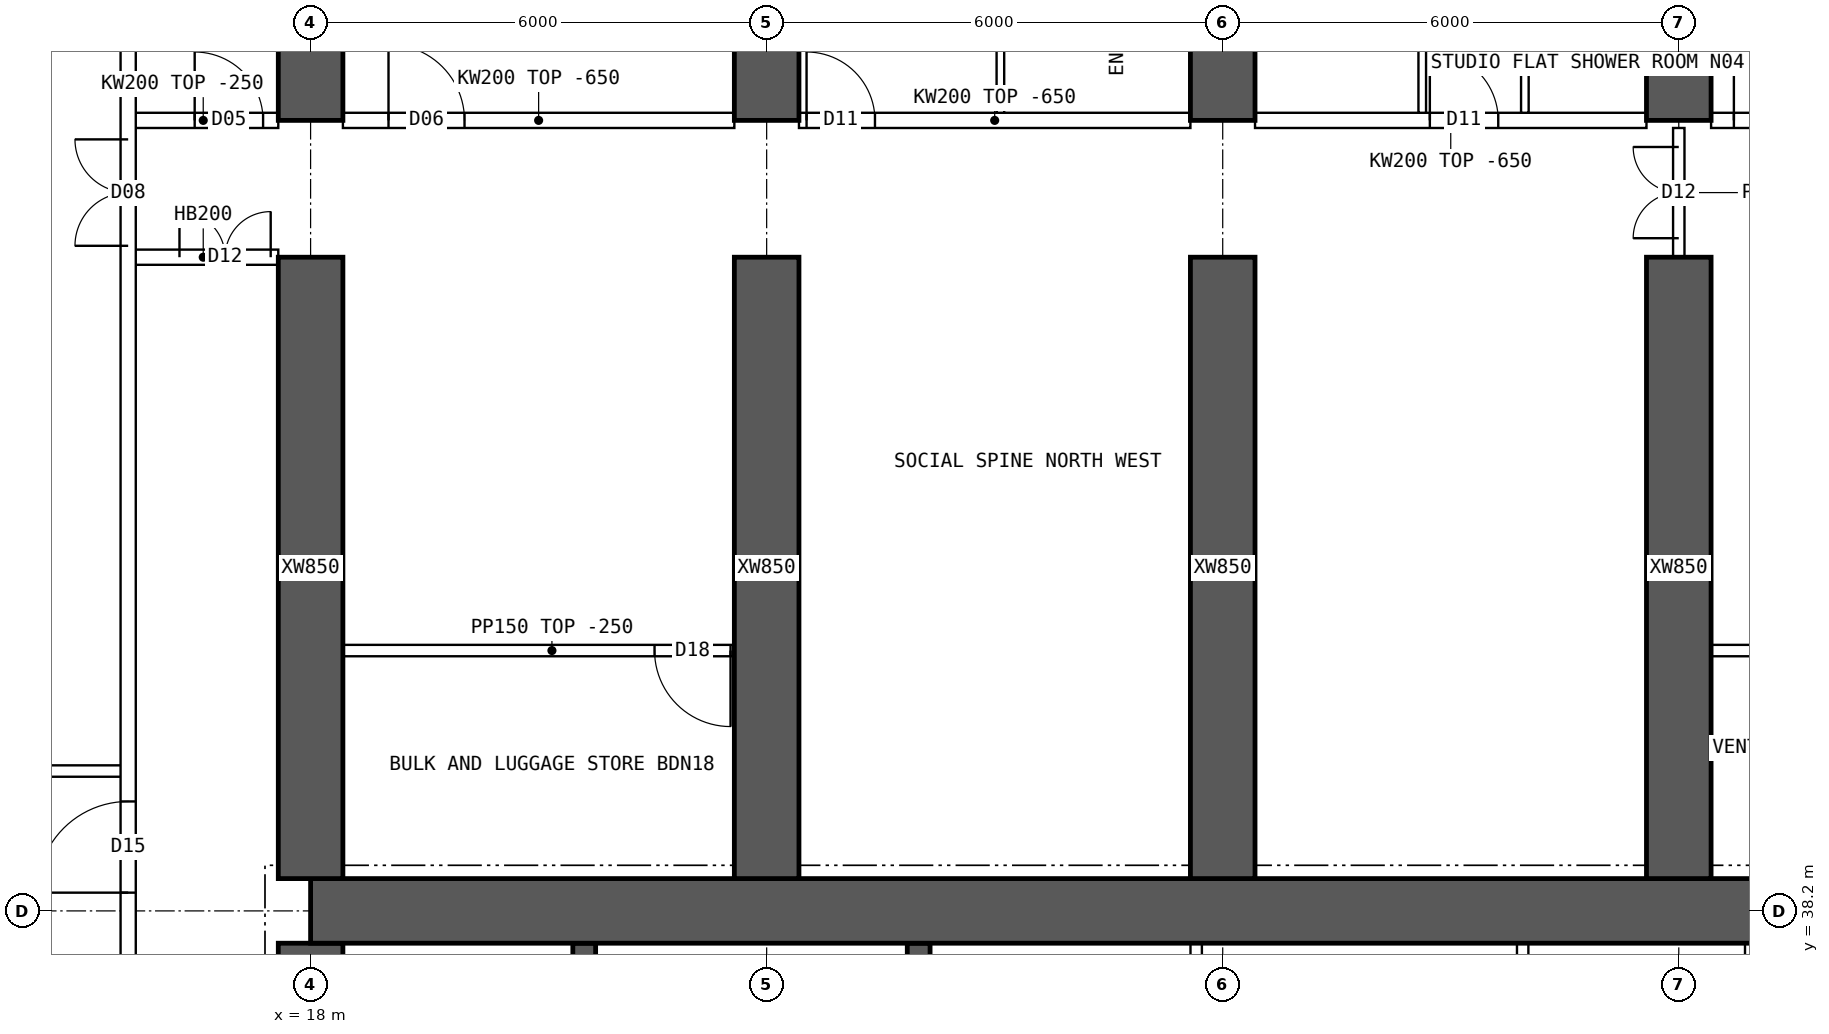
"""IFC4 building model, lengths in metres.
Left out: names, types, materials, properties, quantities, classifications, styles, units other than length and angle.
Written with IfcOpenShell. Run it as: python <this file> out.ifc"""

import sys

from ifc_helpers import new_model, si_unit, direction, frame, frame_2d, origin, place, context, subcontext, project, spatial, polyline, rectangle, outline, extrude, element, fill, save


model = new_model("IFC4")
c1 = context("Model", 3, precision=1e-05, world=origin(), true_north=direction((0.0, 1.0)))
c2 = subcontext(c1, "Body", "Model", "MODEL_VIEW")
j1 = project(units=[si_unit("LENGTHUNIT", "METRE"), si_unit("PLANEANGLEUNIT", "RADIAN")], contexts=[c1])
p1 = place(None, origin())
s1 = spatial("IfcSite", under=j1, at=p1, CompositionType="ELEMENT")
p2 = place(p1, origin())
s2 = spatial("IfcBuilding", under=s1, at=p2, CompositionType="ELEMENT")
p3 = place(p2, frame((0.0, 0.0, 171.1)))
s3 = spatial("IfcBuildingStorey", under=s2, at=p3, CompositionType="ELEMENT", Elevation=171.1)
p4 = place(p3, frame((18.0, 38.2, 0.0), z_axis=(0.0, 0.0, 1.0), x_axis=(1.0, 0.0, 0.0)))
e1 = element("IfcWall", 1, at=p4, inside=s3, PredefinedType="SHEAR", context=c2, shape_type="SweptSolid", body=[
    extrude(rectangle(XDim=48.0, YDim=0.85, at=frame_2d((24.0, 0.0))), origin(), (0.0, 0.0, 1.0), 3.75),
])
p5 = place(p3, frame((18.0, 26.225, 0.0), z_axis=(0.0, 0.0, 1.0), x_axis=(0.0, 1.0, 0.0)))
e2 = element("IfcWall", 2, at=p5, inside=s3, PredefinedType="SHEAR", context=c2, shape_type="SweptSolid", body=[
    extrude(rectangle(XDim=11.55, YDim=0.85, at=frame_2d((5.775, 0.0))), origin(), (0.0, 0.0, 1.0), 3.75),
])
p6 = place(p5, frame((5.075, 0.0, 0.0)))
e3 = element("IfcOpeningElement", 3, at=p6, cuts=e2, PredefinedType="OPENING", context=c2, shape_type="SweptSolid", body=[
    extrude(rectangle(XDim=1.2, YDim=2.1, at=frame_2d((0.6, 1.05))), frame((0.0, 0.435, 0.0), z_axis=(0.0, -1.0, 0.0), x_axis=(1.0, 0.0, 0.0)), (0.0, 0.0, 1.0), 0.87),
])
for number, where, z_axis, x_axis in (
    (4, (21.6, 34.75, 0.0), (0.0, 0.0, 1.0), (0.0, 1.0, 0.0)),
    (5, (26.0, 34.75, 0.0), (0.0, 0.0, 1.0), (0.0, 1.0, 0.0)),
):
    element("IfcWall", number, at=place(p3, frame(where, z_axis=z_axis, x_axis=x_axis)), inside=s3, PredefinedType="SHEAR", context=c2, shape_type="SweptSolid", body=[
        extrude(rectangle(XDim=3.025, YDim=0.3, at=frame_2d((1.512, 0.0))), origin(), (0.0, 0.0, 1.0), 3.75),
    ])
p7 = place(p3, frame((18.0, 48.6, 0.0), z_axis=(0.0, 0.0, 1.0), x_axis=(0.0, 1.0, 0.0)))
e6 = element("IfcWall", 6, at=p7, inside=s3, PredefinedType="SHEAR", context=c2, shape_type="SweptSolid", body=[
    extrude(rectangle(XDim=5.4, YDim=0.85, at=frame_2d((2.7, 0.0))), origin(), (0.0, 0.0, 1.0), 3.75),
])
p8 = place(p3, frame((18.0, 38.625, 0.0), z_axis=(0.0, 0.0, 1.0), x_axis=(0.0, 1.0, 0.0)))
e7 = element("IfcWall", 7, at=p8, inside=s3, PredefinedType="SHEAR", context=c2, shape_type="SweptSolid", body=[
    extrude(rectangle(XDim=8.175, YDim=0.85, at=frame_2d((4.087, 0.0))), origin(), (0.0, 0.0, 1.0), 3.75),
])
p9 = place(p3, frame((24.0, 48.6, 0.0), z_axis=(0.0, 0.0, 1.0), x_axis=(0.0, 1.0, 0.0)))
e8 = element("IfcWall", 8, at=p9, inside=s3, PredefinedType="SHEAR", context=c2, shape_type="SweptSolid", body=[
    extrude(rectangle(XDim=5.4, YDim=0.85, at=frame_2d((2.7, 0.0))), origin(), (0.0, 0.0, 1.0), 3.75),
])
p10 = place(p3, frame((24.0, 38.625, 0.0), z_axis=(0.0, 0.0, 1.0), x_axis=(0.0, 1.0, 0.0)))
e9 = element("IfcWall", 9, at=p10, inside=s3, PredefinedType="SHEAR", context=c2, shape_type="SweptSolid", body=[
    extrude(rectangle(XDim=8.175, YDim=0.85, at=frame_2d((4.087, 0.0))), origin(), (0.0, 0.0, 1.0), 3.75),
])
p11 = place(p3, frame((30.0, 48.6, 0.0), z_axis=(0.0, 0.0, 1.0), x_axis=(0.0, 1.0, 0.0)))
e10 = element("IfcWall", 10, at=p11, inside=s3, PredefinedType="SHEAR", context=c2, shape_type="SweptSolid", body=[
    extrude(rectangle(XDim=5.4, YDim=0.85, at=frame_2d((2.7, 0.0))), origin(), (0.0, 0.0, 1.0), 3.75),
])
p12 = place(p3, frame((30.0, 38.625, 0.0), z_axis=(0.0, 0.0, 1.0), x_axis=(0.0, 1.0, 0.0)))
e11 = element("IfcWall", 11, at=p12, inside=s3, PredefinedType="SHEAR", context=c2, shape_type="SweptSolid", body=[
    extrude(rectangle(XDim=8.175, YDim=0.85, at=frame_2d((4.087, 0.0))), origin(), (0.0, 0.0, 1.0), 3.75),
])
p13 = place(p3, frame((36.0, 48.6, 0.0), z_axis=(0.0, 0.0, 1.0), x_axis=(0.0, 1.0, 0.0)))
e12 = element("IfcWall", 12, at=p13, inside=s3, PredefinedType="SHEAR", context=c2, shape_type="SweptSolid", body=[
    extrude(rectangle(XDim=5.4, YDim=0.85, at=frame_2d((2.7, 0.0))), origin(), (0.0, 0.0, 1.0), 3.75),
])
p14 = place(p3, frame((36.0, 38.625, 0.0), z_axis=(0.0, 0.0, 1.0), x_axis=(0.0, 1.0, 0.0)))
e13 = element("IfcWall", 13, at=p14, inside=s3, PredefinedType="SHEAR", context=c2, shape_type="SweptSolid", body=[
    extrude(rectangle(XDim=8.175, YDim=0.85, at=frame_2d((4.087, 0.0))), origin(), (0.0, 0.0, 1.0), 3.75),
])
for number, where, z_axis, x_axis in (
    (14, (29.651, 34.75, 0.0), (0.0, 0.0, 1.0), (0.0, 1.0, 0.0)),
    (15, (33.946, 34.75, 0.0), (0.0, 0.0, 1.0), (0.0, 1.0, 0.0)),
    (16, (36.946, 34.75, 0.0), (0.0, 0.0, 1.0), (0.0, 1.0, 0.0)),
):
    element("IfcWall", number, at=place(p3, frame(where, z_axis=z_axis, x_axis=x_axis)), inside=s3, PredefinedType="SOLIDWALL", context=c2, shape_type="SweptSolid", body=[
        extrude(rectangle(XDim=3.025, YDim=0.15, at=frame_2d((1.512, 0.0))), origin(), (0.0, 0.0, 1.0), 3.5),
    ])
p15 = place(p3, frame((15.6, 48.6, 0.0), z_axis=(0.0, 0.0, 1.0), x_axis=(1.0, 0.0, 0.0)))
e17 = element("IfcWall", 17, at=p15, inside=s3, PredefinedType="SOLIDWALL", context=c2, shape_type="SweptSolid", body=[
    extrude(rectangle(XDim=1.975, YDim=0.2, at=frame_2d((0.987, 0.0))), origin(), (0.0, 0.0, 1.0), 3.5),
])
p16 = place(p15, frame((0.875, 0.0, 0.0)))
e18 = element("IfcOpeningElement", 18, at=p16, cuts=e17, PredefinedType="OPENING", context=c2, shape_type="SweptSolid", body=[
    extrude(rectangle(XDim=0.9, YDim=2.1, at=frame_2d((0.45, 1.05))), frame((0.0, 0.11, 0.0), z_axis=(0.0, -1.0, 0.0), x_axis=(1.0, 0.0, 0.0)), (0.0, 0.0, 1.0), 0.22),
])
p17 = place(p3, frame((15.6, 46.8, 0.0), z_axis=(0.0, 0.0, 1.0), x_axis=(1.0, 0.0, 0.0)))
e19 = element("IfcWall", 19, at=p17, inside=s3, PredefinedType="SOLIDWALL", context=c2, shape_type="SweptSolid", body=[
    extrude(rectangle(XDim=1.975, YDim=0.2, at=frame_2d((0.987, 0.0))), origin(), (0.0, 0.0, 1.0), 3.5),
])
p18 = place(p17, frame((0.675, 0.0, 0.0)))
e20 = element("IfcOpeningElement", 20, at=p18, cuts=e19, PredefinedType="OPENING", context=c2, shape_type="SweptSolid", body=[
    extrude(rectangle(XDim=1.2, YDim=2.1, at=frame_2d((0.6, 1.05))), frame((0.0, 0.11, 0.0), z_axis=(0.0, -1.0, 0.0), x_axis=(1.0, 0.0, 0.0)), (0.0, 0.0, 1.0), 0.22),
])
p19 = place(p3, frame((18.425, 48.6, 0.0), z_axis=(0.0, 0.0, 1.0), x_axis=(1.0, 0.0, 0.0)))
e21 = element("IfcWall", 21, at=p19, inside=s3, PredefinedType="SOLIDWALL", context=c2, shape_type="SweptSolid", body=[
    extrude(outline(polyline([(0.0, 0.0), (5.15, 0.0), (5.15, 3.1), (0.0, 3.1), (0.0, 0.0)])), frame((0.0, 0.1, 0.0), z_axis=(0.0, -1.0, 0.0), x_axis=(1.0, 0.0, 0.0)), (0.0, 0.0, 1.0), 0.2),
])
p20 = place(p19, frame((0.6, 0.0, 0.0)))
e22 = element("IfcOpeningElement", 22, at=p20, cuts=e21, PredefinedType="OPENING", context=c2, shape_type="SweptSolid", body=[
    extrude(rectangle(XDim=1.0, YDim=2.1, at=frame_2d((0.5, 1.05))), frame((0.0, 0.11, 0.0), z_axis=(0.0, -1.0, 0.0), x_axis=(1.0, 0.0, 0.0)), (0.0, 0.0, 1.0), 0.22),
])
p21 = place(p3, frame((24.425, 48.6, 0.0), z_axis=(0.0, 0.0, 1.0), x_axis=(1.0, 0.0, 0.0)))
e23 = element("IfcWall", 23, at=p21, inside=s3, PredefinedType="SOLIDWALL", context=c2, shape_type="SweptSolid", body=[
    extrude(outline(polyline([(0.0, 0.0), (5.15, 0.0), (5.15, 3.1), (0.0, 3.1), (0.0, 0.0)])), frame((0.0, 0.1, 0.0), z_axis=(0.0, -1.0, 0.0), x_axis=(1.0, 0.0, 0.0)), (0.0, 0.0, 1.0), 0.2),
])
p22 = place(p21, frame((0.1, 0.0, 0.0)))
e24 = element("IfcOpeningElement", 24, at=p22, cuts=e23, PredefinedType="OPENING", context=c2, shape_type="SweptSolid", body=[
    extrude(rectangle(XDim=0.9, YDim=2.1, at=frame_2d((0.45, 1.05))), frame((0.0, 0.11, 0.0), z_axis=(0.0, -1.0, 0.0), x_axis=(1.0, 0.0, 0.0)), (0.0, 0.0, 1.0), 0.22),
])
p23 = place(p3, frame((30.425, 48.6, 0.0), z_axis=(0.0, 0.0, 1.0), x_axis=(1.0, 0.0, 0.0)))
e25 = element("IfcWall", 25, at=p23, inside=s3, PredefinedType="SOLIDWALL", context=c2, shape_type="SweptSolid", body=[
    extrude(outline(polyline([(0.0, 0.0), (5.15, 0.0), (5.15, 3.1), (0.0, 3.1), (0.0, 0.0)])), frame((0.0, 0.1, 0.0), z_axis=(0.0, -1.0, 0.0), x_axis=(1.0, 0.0, 0.0)), (0.0, 0.0, 1.0), 0.2),
])
p24 = place(p23, frame((2.3, 0.0, 0.0)))
e26 = element("IfcOpeningElement", 26, at=p24, cuts=e25, PredefinedType="OPENING", context=c2, shape_type="SweptSolid", body=[
    extrude(rectangle(XDim=0.9, YDim=2.1, at=frame_2d((0.45, 1.05))), frame((0.0, 0.11, 0.0), z_axis=(0.0, -1.0, 0.0), x_axis=(1.0, 0.0, 0.0)), (0.0, 0.0, 1.0), 0.22),
])
p25 = place(p3, frame((36.425, 48.6, 0.0), z_axis=(0.0, 0.0, 1.0), x_axis=(1.0, 0.0, 0.0)))
e27 = element("IfcWall", 27, at=p25, inside=s3, PredefinedType="SOLIDWALL", context=c2, shape_type="SweptSolid", body=[
    extrude(outline(polyline([(0.0, 0.0), (5.15, 0.0), (5.15, 3.1), (0.0, 3.1), (0.0, 0.0)])), frame((0.0, 0.1, 0.0), z_axis=(0.0, -1.0, 0.0), x_axis=(1.0, 0.0, 0.0)), (0.0, 0.0, 1.0), 0.2),
])
p26 = place(p25, frame((0.3, 0.0, 0.0)))
e28 = element("IfcOpeningElement", 28, at=p26, cuts=e27, PredefinedType="OPENING", context=c2, shape_type="SweptSolid", body=[
    extrude(rectangle(XDim=1.0, YDim=2.1, at=frame_2d((0.5, 1.05))), frame((0.0, 0.11, 0.0), z_axis=(0.0, -1.0, 0.0), x_axis=(1.0, 0.0, 0.0)), (0.0, 0.0, 1.0), 0.22),
])
p27 = place(p3, frame((27.075, 51.45, 0.0), z_axis=(0.0, 0.0, 1.0), x_axis=(0.0, -1.0, 0.0)))
e29 = element("IfcWall", 29, at=p27, inside=s3, PredefinedType="PARTITIONING", context=c2, shape_type="SweptSolid", body=[
    extrude(outline(polyline([(0.0, 0.0), (2.75, 0.0), (2.75, 3.1), (2.702, 3.1), (2.7, 3.5), (0.0, 3.5), (0.0, 0.0)])), frame((0.0, 0.05, 0.0), z_axis=(0.0, -1.0, 0.0), x_axis=(1.0, 0.0, 0.0)), (0.0, 0.0, 1.0), 0.1),
])
p28 = place(p3, frame((32.625, 51.05, 0.0), z_axis=(0.0, 0.0, 1.0), x_axis=(0.0, -1.0, 0.0)))
e30 = element("IfcWall", 30, at=p28, inside=s3, PredefinedType="PARTITIONING", context=c2, shape_type="SweptSolid", body=[
    extrude(outline(polyline([(0.0, 0.0), (2.35, 0.0), (2.35, 3.1), (2.302, 3.1), (2.3, 3.5), (0.0, 3.5), (0.0, 0.0)])), frame((0.0, 0.05, 0.0), z_axis=(0.0, -1.0, 0.0), x_axis=(1.0, 0.0, 0.0)), (0.0, 0.0, 1.0), 0.1),
])
p29 = place(p3, frame((33.975, 51.05, 0.0), z_axis=(0.0, 0.0, 1.0), x_axis=(0.0, -1.0, 0.0)))
e31 = element("IfcWall", 31, at=p29, inside=s3, PredefinedType="PARTITIONING", context=c2, shape_type="SweptSolid", body=[
    extrude(outline(polyline([(0.0, 0.0), (2.35, 0.0), (2.35, 3.1), (2.302, 3.1), (2.3, 3.5), (0.0, 3.5), (0.0, 0.0)])), frame((0.0, 0.05, 0.0), z_axis=(0.0, -1.0, 0.0), x_axis=(1.0, 0.0, 0.0)), (0.0, 0.0, 1.0), 0.1),
])
p30 = place(p29, frame((0.8, 0.0, 0.0)))
e32 = element("IfcOpeningElement", 32, at=p30, cuts=e31, PredefinedType="OPENING", context=c2, shape_type="SweptSolid", body=[
    extrude(rectangle(XDim=0.8, YDim=2.1, at=frame_2d((0.4, 1.05))), frame((0.0, 0.06, 0.0), z_axis=(0.0, -1.0, 0.0), x_axis=(1.0, 0.0, 0.0)), (0.0, 0.0, 1.0), 0.12),
])
p31 = place(p3, frame((23.925, 41.625, 0.0), z_axis=(0.0, 0.0, 1.0), x_axis=(-1.0, 0.0, 0.0)))
e33 = element("IfcWall", 33, at=p31, inside=s3, PredefinedType="PARTITIONING", context=c2, shape_type="SweptSolid", body=[
    extrude(rectangle(XDim=5.5, YDim=0.15, at=frame_2d((2.75, 0.0))), origin(), (0.0, 0.0, 1.0), 3.5),
])
p32 = place(p31, frame((0.4, 0.0, 0.0)))
e34 = element("IfcOpeningElement", 34, at=p32, cuts=e33, PredefinedType="OPENING", context=c2, shape_type="SweptSolid", body=[
    extrude(rectangle(XDim=1.0, YDim=2.1, at=frame_2d((0.5, 1.05))), frame((0.0, 0.085, 0.0), z_axis=(0.0, -1.0, 0.0), x_axis=(1.0, 0.0, 0.0)), (0.0, 0.0, 1.0), 0.17),
])
p33 = place(p3, frame((41.575, 41.625, 0.0), z_axis=(0.0, 0.0, 1.0), x_axis=(-1.0, 0.0, 0.0)))
e35 = element("IfcWall", 35, at=p33, inside=s3, PredefinedType="PARTITIONING", context=c2, shape_type="SweptSolid", body=[
    extrude(rectangle(XDim=5.5, YDim=0.15, at=frame_2d((2.75, 0.0))), origin(), (0.0, 0.0, 1.0), 3.5),
])
p34 = place(p33, frame((0.4, 0.0, 0.0)))
e36 = element("IfcOpeningElement", 36, at=p34, cuts=e35, PredefinedType="OPENING", context=c2, shape_type="SweptSolid", body=[
    extrude(rectangle(XDim=1.0, YDim=2.1, at=frame_2d((0.5, 1.05))), frame((0.0, 0.085, 0.0), z_axis=(0.0, -1.0, 0.0), x_axis=(1.0, 0.0, 0.0)), (0.0, 0.0, 1.0), 0.17),
])
p35 = place(p3, frame((36.0, 46.8, 0.0), z_axis=(0.0, 0.0, 1.0), x_axis=(0.0, 1.0, 0.0)))
e37 = element("IfcWall", 37, at=p35, inside=s3, PredefinedType="PARTITIONING", context=c2, shape_type="SweptSolid", body=[
    extrude(outline(polyline([(0.0, 0.0), (1.7, 0.0), (1.7, 3.1), (0.0, 3.1), (0.0, 0.0)])), frame((0.0, 0.075, 0.0), z_axis=(0.0, -1.0, 0.0), x_axis=(1.0, 0.0, 0.0)), (0.0, 0.0, 1.0), 0.15),
])
p36 = place(p35, frame((0.25, 0.0, 0.0)))
e38 = element("IfcOpeningElement", 38, at=p36, cuts=e37, PredefinedType="OPENING", context=c2, shape_type="SweptSolid", body=[
    extrude(rectangle(XDim=1.2, YDim=2.1, at=frame_2d((0.6, 1.05))), frame((0.0, 0.085, 0.0), z_axis=(0.0, -1.0, 0.0), x_axis=(1.0, 0.0, 0.0)), (0.0, 0.0, 1.0), 0.17),
])
p37 = place(p3, frame((15.6, 10.446, 0.0), z_axis=(0.0, 0.0, 1.0), x_axis=(0.0, 1.0, 0.0)))
e39 = element("IfcWall", 39, at=p37, inside=s3, PredefinedType="SOLIDWALL", context=c2, shape_type="SweptSolid", body=[
    extrude(rectangle(XDim=43.107, YDim=0.2, at=frame_2d((21.554, 0.0))), origin(), (0.0, 0.0, 1.0), 3.5),
])
p38 = place(p37, frame((13.914, 0.0, 0.0)))
e40 = element("IfcOpeningElement", 40, at=p38, cuts=e39, PredefinedType="OPENING", context=c2, shape_type="SweptSolid", body=[
    extrude(rectangle(XDim=1.2, YDim=2.1, at=frame_2d((0.6, 1.05))), frame((0.0, 0.11, 0.0), z_axis=(0.0, -1.0, 0.0), x_axis=(1.0, 0.0, 0.0)), (0.0, 0.0, 1.0), 0.22),
])
p39 = place(p37, frame((27.994, 0.0, 0.0)))
e41 = element("IfcOpeningElement", 41, at=p39, cuts=e39, PredefinedType="OPENING", context=c2, shape_type="SweptSolid", body=[
    extrude(rectangle(XDim=1.2, YDim=2.1, at=frame_2d((0.6, 1.05))), frame((0.0, 0.11, 0.0), z_axis=(0.0, -1.0, 0.0), x_axis=(1.0, 0.0, 0.0)), (0.0, 0.0, 1.0), 0.22),
])
p40 = place(p37, frame((5.104, 0.0, 0.0)))
e42 = element("IfcOpeningElement", 42, at=p40, cuts=e39, PredefinedType="OPENING", context=c2, shape_type="SweptSolid", body=[
    extrude(rectangle(XDim=1.4, YDim=2.1, at=frame_2d((0.7, 1.05))), frame((0.0, 0.11, 0.0), z_axis=(0.0, -1.0, 0.0), x_axis=(1.0, 0.0, 0.0)), (0.0, 0.0, 1.0), 0.22),
])
p41 = place(p37, frame((36.504, 0.0, 0.0)))
e43 = element("IfcOpeningElement", 43, at=p41, cuts=e39, PredefinedType="OPENING", context=c2, shape_type="SweptSolid", body=[
    extrude(rectangle(XDim=1.4, YDim=2.1, at=frame_2d((0.7, 1.05))), frame((0.0, 0.11, 0.0), z_axis=(0.0, -1.0, 0.0), x_axis=(1.0, 0.0, 0.0)), (0.0, 0.0, 1.0), 0.22),
])
p42 = place(p3, frame((8.705, 40.04, 0.0), z_axis=(0.0, 0.0, 1.0), x_axis=(1.0, 0.0, 0.0)))
e44 = element("IfcWall", 44, at=p42, inside=s3, PredefinedType="PARTITIONING", context=c2, shape_type="SweptSolid", body=[
    extrude(rectangle(XDim=6.82, YDim=0.15, at=frame_2d((3.41, 0.0))), origin(), (0.0, 0.0, 1.0), 3.5),
])
p43 = place(p18, origin())
e45 = element("IfcDoor", 45, at=p43, inside=s3, OperationType="DOUBLE_DOOR_SINGLE_SWING", PredefinedType="DOOR", context=c2, shape_type="SweptSolid", body=[
    extrude(rectangle(XDim=1.2, YDim=2.1, at=frame_2d((0.6, 1.05))), frame((0.0, 0.025, 0.0), z_axis=(0.0, -1.0, 0.0), x_axis=(1.0, 0.0, 0.0)), (0.0, 0.0, 1.0), 0.05),
])
fill(e20, e45)
p44 = place(p20, origin())
e46 = element("IfcDoor", 46, at=p44, inside=s3, OperationType="SINGLE_SWING_LEFT", PredefinedType="DOOR", context=c2, shape_type="SweptSolid", body=[
    extrude(rectangle(XDim=1.0, YDim=2.1, at=frame_2d((0.5, 1.05))), frame((0.0, 0.025, 0.0), z_axis=(0.0, -1.0, 0.0), x_axis=(1.0, 0.0, 0.0)), (0.0, 0.0, 1.0), 0.05),
])
fill(e22, e46)
p45 = place(p22, origin())
e47 = element("IfcDoor", 47, at=p45, inside=s3, OperationType="SINGLE_SWING_LEFT", PredefinedType="DOOR", context=c2, shape_type="SweptSolid", body=[
    extrude(rectangle(XDim=0.9, YDim=2.1, at=frame_2d((0.45, 1.05))), frame((0.0, 0.025, 0.0), z_axis=(0.0, -1.0, 0.0), x_axis=(1.0, 0.0, 0.0)), (0.0, 0.0, 1.0), 0.05),
])
fill(e24, e47)
p46 = place(p30, origin())
e48 = element("IfcDoor", 48, at=p46, inside=s3, OperationType="SINGLE_SWING_RIGHT", PredefinedType="DOOR", context=c2, shape_type="SweptSolid", body=[
    extrude(rectangle(XDim=0.8, YDim=2.1, at=frame_2d((0.4, 1.05))), frame((0.0, 0.025, 0.0), z_axis=(0.0, -1.0, 0.0), x_axis=(1.0, 0.0, 0.0)), (0.0, 0.0, 1.0), 0.05),
])
fill(e32, e48)
p47 = place(p24, origin())
e49 = element("IfcDoor", 49, at=p47, inside=s3, OperationType="SINGLE_SWING_LEFT", PredefinedType="DOOR", context=c2, shape_type="SweptSolid", body=[
    extrude(rectangle(XDim=0.9, YDim=2.1, at=frame_2d((0.45, 1.05))), frame((0.0, 0.025, 0.0), z_axis=(0.0, -1.0, 0.0), x_axis=(1.0, 0.0, 0.0)), (0.0, 0.0, 1.0), 0.05),
])
fill(e26, e49)
p48 = place(p26, origin())
e50 = element("IfcDoor", 50, at=p48, inside=s3, OperationType="SINGLE_SWING_LEFT", PredefinedType="DOOR", context=c2, shape_type="SweptSolid", body=[
    extrude(rectangle(XDim=1.0, YDim=2.1, at=frame_2d((0.5, 1.05))), frame((0.0, 0.025, 0.0), z_axis=(0.0, -1.0, 0.0), x_axis=(1.0, 0.0, 0.0)), (0.0, 0.0, 1.0), 0.05),
])
fill(e28, e50)
p49 = place(p32, origin())
e51 = element("IfcDoor", 51, at=p49, inside=s3, OperationType="SINGLE_SWING_LEFT", PredefinedType="DOOR", context=c2, shape_type="SweptSolid", body=[
    extrude(rectangle(XDim=1.0, YDim=2.1, at=frame_2d((0.5, 1.05))), frame((0.0, 0.025, 0.0), z_axis=(0.0, -1.0, 0.0), x_axis=(1.0, 0.0, 0.0)), (0.0, 0.0, 1.0), 0.05),
])
fill(e34, e51)
p50 = place(p36, origin())
e52 = element("IfcDoor", 52, at=p50, inside=s3, OperationType="DOUBLE_DOOR_SINGLE_SWING", PredefinedType="DOOR", context=c2, shape_type="SweptSolid", body=[
    extrude(rectangle(XDim=1.2, YDim=2.1, at=frame_2d((0.6, 1.05))), frame((0.0, 0.025, 0.0), z_axis=(0.0, -1.0, 0.0), x_axis=(1.0, 0.0, 0.0)), (0.0, 0.0, 1.0), 0.05),
])
fill(e38, e52)
p51 = place(p39, origin())
e53 = element("IfcDoor", 53, at=p51, inside=s3, OperationType="SINGLE_SWING_LEFT", PredefinedType="DOOR", context=c2, shape_type="SweptSolid", body=[
    extrude(rectangle(XDim=1.2, YDim=2.1, at=frame_2d((0.6, 1.05))), frame((0.0, 0.025, 0.0), z_axis=(0.0, -1.0, 0.0), x_axis=(1.0, 0.0, 0.0)), (0.0, 0.0, 1.0), 0.05),
])
fill(e41, e53)
p52 = place(p41, origin())
e54 = element("IfcDoor", 54, at=p52, inside=s3, OperationType="DOUBLE_DOOR_SINGLE_SWING", PredefinedType="DOOR", context=c2, shape_type="SweptSolid", body=[
    extrude(rectangle(XDim=1.4, YDim=2.1, at=frame_2d((0.7, 1.05))), frame((0.0, 0.025, 0.0), z_axis=(0.0, -1.0, 0.0), x_axis=(1.0, 0.0, 0.0)), (0.0, 0.0, 1.0), 0.05),
])
fill(e43, e54)
p53 = place(p16, origin())
e55 = element("IfcDoor", 55, at=p53, inside=s3, OperationType="SINGLE_SWING_LEFT", PredefinedType="DOOR", context=c2, shape_type="SweptSolid", body=[
    extrude(rectangle(XDim=0.9, YDim=2.1, at=frame_2d((0.45, 1.05))), frame((0.0, 0.025, 0.0), z_axis=(0.0, -1.0, 0.0), x_axis=(1.0, 0.0, 0.0)), (0.0, 0.0, 1.0), 0.05),
])
fill(e18, e55)
save(model, sys.argv[1])
